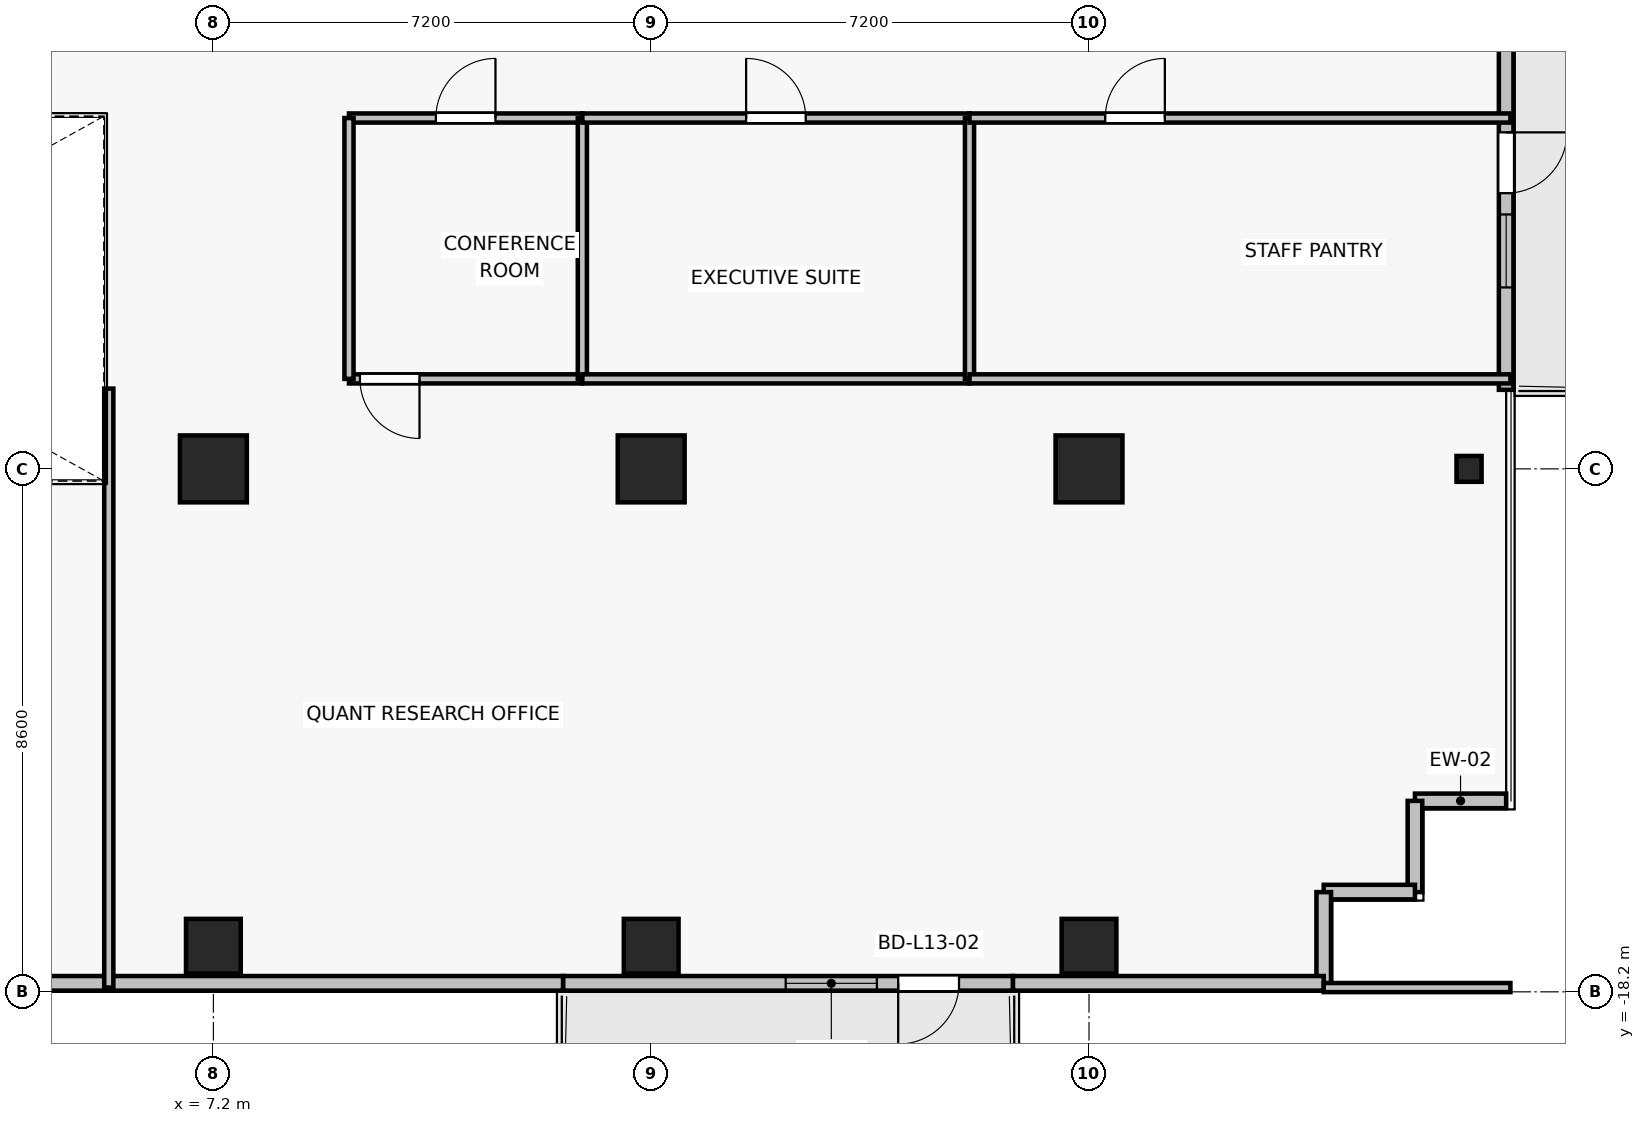
"""IFC4 building model, lengths in metres.
Left out: names, types, materials, properties, quantities, classifications, styles, units other than length and angle.
Written with IfcOpenShell. Run it as: python <this file> out.ifc"""

import sys

from ifc_helpers import new_model, si_unit, direction, frame, frame_2d, origin, origin_2d, place, context, subcontext, project, spatial, rectangle, i_section, extrude, source, transform, mapped, element, fill, save


model = new_model("IFC4")
c1 = context("Model", 3, precision=1e-05, world=origin(), true_north=direction((0.0, 1.0)))
c2 = subcontext(c1, "Body", "Model", "MODEL_VIEW")
j1 = project(units=[si_unit("LENGTHUNIT", "METRE"), si_unit("PLANEANGLEUNIT", "RADIAN")], contexts=[c1])
p1 = place(None, origin())
s1 = spatial("IfcSite", under=j1, at=p1, CompositionType="ELEMENT")
p2 = place(p1, origin())
s2 = spatial("IfcBuilding", under=s1, at=p2, CompositionType="ELEMENT")
p3 = place(p2, frame((0.0, 0.0, 50.5)))
s3 = spatial("IfcBuildingStorey", under=s2, at=p3, CompositionType="ELEMENT", Elevation=50.5)
for number, where, z_axis, x_axis in (
    (1, (7.2, -9.6, 0.0), (0.0, 0.0, 1.0), (1.0, 0.0, 0.0)),
    (2, (14.4, -9.6, 0.0), (0.0, 0.0, 1.0), (1.0, 0.0, 0.0)),
    (3, (21.6, -9.6, 0.0), (0.0, 0.0, 1.0), (1.0, 0.0, 0.0)),
):
    element("IfcColumn", number, at=place(p3, frame(where, z_axis=z_axis, x_axis=x_axis)), inside=s3, PredefinedType="COLUMN", context=c2, shape_type="SweptSolid", body=[
        extrude(rectangle(XDim=1.1, YDim=1.1, at=origin_2d()), origin(), (0.0, 0.0, 1.0), 3.3),
    ])
for number, where, z_axis, x_axis in (
    (4, (7.2, -17.45, 0.0), (0.0, 0.0, 1.0), (1.0, 0.0, 0.0)),
    (5, (14.4, -17.45, 0.0), (0.0, 0.0, 1.0), (1.0, 0.0, 0.0)),
    (6, (21.6, -17.45, 0.0), (0.0, 0.0, 1.0), (1.0, 0.0, 0.0)),
):
    element("IfcColumn", number, at=place(p3, frame(where, z_axis=z_axis, x_axis=x_axis)), inside=s3, PredefinedType="COLUMN", context=c2, shape_type="SweptSolid", body=[
        extrude(rectangle(XDim=0.9, YDim=0.9, at=origin_2d()), origin(), (0.0, 0.0, 1.0), 3.3),
    ])
p4 = place(p3, frame((27.85, -9.6, 0.0), z_axis=(0.0, 0.0, 1.0), x_axis=(1.0, 0.0, 0.0)))
e7 = element("IfcColumn", 7, at=p4, inside=s3, PredefinedType="COLUMN", context=c2, shape_type="SweptSolid", body=[
    extrude(i_section(OverallWidth=0.412, OverallDepth=0.425, WebThickness=0.026, FlangeThickness=0.039, FilletRadius=0.015, at=origin_2d()), origin(), (0.0, 0.0, 1.0), 3.3),
])
p5 = place(p3, frame((20.35, -18.06, 0.0), z_axis=(0.0, 0.0, 1.0), x_axis=(-1.0, 0.0, 0.0)))
e8 = element("IfcWall", 8, at=p5, inside=s3, PredefinedType="SOLIDWALL", context=c2, shape_type="SweptSolid", body=[
    extrude(rectangle(XDim=7.4, YDim=0.24, at=frame_2d((3.7, 0.0))), origin(), (0.0, 0.0, 1.0), 2.59),
])
p6 = place(p5, frame((0.888, 0.0, 0.0)))
e9 = element("IfcOpeningElement", 9, at=p6, cuts=e8, PredefinedType="OPENING", context=c2, shape_type="SweptSolid", body=[
    extrude(rectangle(XDim=1.0, YDim=2.2, at=frame_2d((0.5, 1.1))), frame((0.0, 0.13, 0.0), z_axis=(0.0, -1.0, 0.0), x_axis=(1.0, 0.0, 0.0)), (0.0, 0.0, 1.0), 0.26),
])
p7 = place(p5, frame((2.238, 0.0, 0.85)))
e10 = element("IfcOpeningElement", 10, at=p7, cuts=e8, PredefinedType="OPENING", context=c2, shape_type="SweptSolid", body=[
    extrude(rectangle(XDim=1.5, YDim=1.6, at=frame_2d((0.75, 0.8))), frame((0.0, 0.13, 0.0), z_axis=(0.0, -1.0, 0.0), x_axis=(1.0, 0.0, 0.0)), (0.0, 0.0, 1.0), 0.26),
])
p8 = place(p3, frame((28.46, -2.5, 0.0), z_axis=(0.0, 0.0, 1.0), x_axis=(0.0, -1.0, 0.0)))
e11 = element("IfcWall", 11, at=p8, inside=s3, PredefinedType="SOLIDWALL", context=c2, shape_type="SweptSolid", body=[
    extrude(rectangle(XDim=5.8, YDim=0.24, at=frame_2d((2.9, 0.0))), origin(), (0.0, 0.0, 1.0), 2.565),
])
p9 = place(p8, frame((1.566, 0.0, 0.0)))
e12 = element("IfcOpeningElement", 12, at=p9, cuts=e11, PredefinedType="OPENING", context=c2, shape_type="SweptSolid", body=[
    extrude(rectangle(XDim=1.0, YDim=2.2, at=frame_2d((0.5, 1.1))), frame((0.0, 0.13, 0.0), z_axis=(0.0, -1.0, 0.0), x_axis=(1.0, 0.0, 0.0)), (0.0, 0.0, 1.0), 0.26),
])
p10 = place(p8, frame((2.916, 0.0, 0.85)))
e13 = element("IfcOpeningElement", 13, at=p10, cuts=e11, PredefinedType="OPENING", context=c2, shape_type="SweptSolid", body=[
    extrude(rectangle(XDim=1.2, YDim=1.5, at=frame_2d((0.6, 0.75))), frame((0.0, 0.13, 0.0), z_axis=(0.0, -1.0, 0.0), x_axis=(1.0, 0.0, 0.0)), (0.0, 0.0, 1.0), 0.26),
])
for number, where, z_axis, x_axis in (
    (14, (26.96, -15.06, 0.0), (0.0, 0.0, 1.0), (1.0, 0.0, 0.0)),
    (15, (26.96, -16.56, 0.0), (0.0, 0.0, 1.0), (0.0, 1.0, 0.0)),
    (16, (25.46, -16.56, 0.0), (0.0, 0.0, 1.0), (1.0, 0.0, 0.0)),
    (17, (25.46, -18.06, 0.0), (0.0, 0.0, 1.0), (0.0, 1.0, 0.0)),
):
    element("IfcWall", number, at=place(p3, frame(where, z_axis=z_axis, x_axis=x_axis)), inside=s3, PredefinedType="SOLIDWALL", context=c2, shape_type="SweptSolid", body=[
        extrude(rectangle(XDim=1.5, YDim=0.24, at=frame_2d((0.75, 0.0))), origin(), (0.0, 0.0, 1.0), 3.075),
    ])
p11 = place(p3, frame((20.35, -18.06, 0.0), z_axis=(0.0, 0.0, 1.0), x_axis=(1.0, 0.0, 0.0)))
e18 = element("IfcWall", 18, at=p11, inside=s3, PredefinedType="SOLIDWALL", context=c2, shape_type="SweptSolid", body=[
    extrude(rectangle(XDim=5.11, YDim=0.24, at=frame_2d((2.555, 0.0))), origin(), (0.0, 0.0, 1.0), 2.59),
])
p12 = place(p3, frame((3.34, -18.06, 0.0), z_axis=(0.0, 0.0, 1.0), x_axis=(1.0, 0.0, 0.0)))
e19 = element("IfcWall", 19, at=p12, inside=s3, PredefinedType="SOLIDWALL", context=c2, shape_type="SweptSolid", body=[
    extrude(rectangle(XDim=9.61, YDim=0.24, at=frame_2d((4.805, 0.0))), origin(), (0.0, 0.0, 1.0), 2.59),
])
p13 = place(p3, frame((13.268, -8.12, 0.0), z_axis=(0.0, 0.0, 1.0), x_axis=(-1.0, 0.0, 0.0)))
e20 = element("IfcWall", 20, at=p13, inside=s3, PredefinedType="PARTITIONING", context=c2, shape_type="SweptSolid", body=[
    extrude(rectangle(XDim=3.838, YDim=0.15, at=frame_2d((1.919, 0.0))), origin(), (0.0, 0.0, 1.0), 3.075),
])
p14 = place(p13, frame((2.678, 0.0, 0.0)))
e21 = element("IfcOpeningElement", 21, at=p14, cuts=e20, PredefinedType="OPENING", context=c2, shape_type="SweptSolid", body=[
    extrude(rectangle(XDim=0.98, YDim=2.15, at=frame_2d((0.49, 1.075))), frame((0.0, 0.085, 0.0), z_axis=(0.0, -1.0, 0.0), x_axis=(1.0, 0.0, 0.0)), (0.0, 0.0, 1.0), 0.17),
])
p15 = place(p3, frame((9.43, -3.83, 0.0), z_axis=(0.0, 0.0, 1.0), x_axis=(1.0, 0.0, 0.0)))
e22 = element("IfcWall", 22, at=p15, inside=s3, PredefinedType="PARTITIONING", context=c2, shape_type="SweptSolid", body=[
    extrude(rectangle(XDim=3.838, YDim=0.15, at=frame_2d((1.919, 0.0))), origin(), (0.0, 0.0, 1.0), 3.075),
])
p16 = place(p15, frame((1.429, 0.0, 0.0)))
e23 = element("IfcOpeningElement", 23, at=p16, cuts=e22, PredefinedType="OPENING", context=c2, shape_type="SweptSolid", body=[
    extrude(rectangle(XDim=0.98, YDim=2.15, at=frame_2d((0.49, 1.075))), frame((0.0, 0.085, 0.0), z_axis=(0.0, -1.0, 0.0), x_axis=(1.0, 0.0, 0.0)), (0.0, 0.0, 1.0), 0.17),
])
for number, where, z_axis, x_axis in (
    (24, (9.43, -8.12, 0.0), (0.0, 0.0, 1.0), (0.0, 1.0, 0.0)),
    (25, (13.268, -3.83, 0.0), (0.0, 0.0, 1.0), (0.0, -1.0, 0.0)),
):
    element("IfcWall", number, at=place(p3, frame(where, z_axis=z_axis, x_axis=x_axis)), inside=s3, PredefinedType="PARTITIONING", context=c2, shape_type="SweptSolid", body=[
        extrude(rectangle(XDim=4.29, YDim=0.15, at=frame_2d((2.145, 0.0))), origin(), (0.0, 0.0, 1.0), 2.565),
    ])
p17 = place(p3, frame((19.635, -8.12, 0.0), z_axis=(0.0, 0.0, 1.0), x_axis=(-1.0, 0.0, 0.0)))
e26 = element("IfcWall", 26, at=p17, inside=s3, PredefinedType="PARTITIONING", context=c2, shape_type="SweptSolid", body=[
    extrude(rectangle(XDim=6.367, YDim=0.15, at=frame_2d((3.183, 0.0))), origin(), (0.0, 0.0, 1.0), 2.465),
])
p18 = place(p3, frame((13.268, -3.83, 0.0), z_axis=(0.0, 0.0, 1.0), x_axis=(1.0, 0.0, 0.0)))
e27 = element("IfcWall", 27, at=p18, inside=s3, PredefinedType="PARTITIONING", context=c2, shape_type="SweptSolid", body=[
    extrude(rectangle(XDim=6.367, YDim=0.15, at=frame_2d((3.183, 0.0))), origin(), (0.0, 0.0, 1.0), 2.465),
])
p19 = place(p18, frame((2.693, 0.0, 0.0)))
e28 = element("IfcOpeningElement", 28, at=p19, cuts=e27, PredefinedType="OPENING", context=c2, shape_type="SweptSolid", body=[
    extrude(rectangle(XDim=0.98, YDim=2.15, at=frame_2d((0.49, 1.075))), frame((0.0, 0.085, 0.0), z_axis=(0.0, -1.0, 0.0), x_axis=(1.0, 0.0, 0.0)), (0.0, 0.0, 1.0), 0.17),
])
p20 = place(p3, frame((19.635, -3.83, 0.0), z_axis=(0.0, 0.0, 1.0), x_axis=(0.0, -1.0, 0.0)))
e29 = element("IfcWall", 29, at=p20, inside=s3, PredefinedType="PARTITIONING", context=c2, shape_type="SweptSolid", body=[
    extrude(rectangle(XDim=4.29, YDim=0.15, at=frame_2d((2.145, 0.0))), origin(), (0.0, 0.0, 1.0), 2.565),
])
p21 = place(p3, frame((28.53, -8.12, 0.0), z_axis=(0.0, 0.0, 1.0), x_axis=(-1.0, 0.0, 0.0)))
e30 = element("IfcWall", 30, at=p21, inside=s3, PredefinedType="PARTITIONING", context=c2, shape_type="SweptSolid", body=[
    extrude(rectangle(XDim=8.895, YDim=0.15, at=frame_2d((4.448, 0.0))), origin(), (0.0, 0.0, 1.0), 2.465),
])
p22 = place(p3, frame((19.635, -3.83, 0.0), z_axis=(0.0, 0.0, 1.0), x_axis=(1.0, 0.0, 0.0)))
e31 = element("IfcWall", 31, at=p22, inside=s3, PredefinedType="PARTITIONING", context=c2, shape_type="SweptSolid", body=[
    extrude(rectangle(XDim=8.895, YDim=0.15, at=frame_2d((4.448, 0.0))), origin(), (0.0, 0.0, 1.0), 2.465),
])
p23 = place(p22, frame((2.232, 0.0, 0.0)))
e32 = element("IfcOpeningElement", 32, at=p23, cuts=e31, PredefinedType="OPENING", context=c2, shape_type="SweptSolid", body=[
    extrude(rectangle(XDim=0.98, YDim=2.15, at=frame_2d((0.49, 1.075))), frame((0.0, 0.085, 0.0), z_axis=(0.0, -1.0, 0.0), x_axis=(1.0, 0.0, 0.0)), (0.0, 0.0, 1.0), 0.17),
])
p24 = place(p3, frame((28.53, -18.13, 0.0), z_axis=(0.0, 0.0, 1.0), x_axis=(-1.0, 0.0, 0.0)))
e33 = element("IfcWall", 33, at=p24, inside=s3, PredefinedType="PARTITIONING", context=c2, shape_type="SweptSolid", body=[
    extrude(rectangle(XDim=3.07, YDim=0.15, at=frame_2d((1.535, 0.0))), origin(), (0.0, 0.0, 1.0), 2.59),
])
p25 = place(p3, frame((5.48, -18.13, 0.0), z_axis=(0.0, 0.0, 1.0), x_axis=(0.0, 1.0, 0.0)))
e34 = element("IfcWall", 34, at=p25, inside=s3, PredefinedType="PARTITIONING", context=c2, shape_type="SweptSolid", body=[
    extrude(rectangle(XDim=9.85, YDim=0.15, at=frame_2d((4.925, 0.0))), origin(), (0.0, 0.0, 1.0), 2.465),
])
m1 = source(origin(), c2, "Body", "SweptSolid", [
    extrude(rectangle(XDim=1.0, YDim=2.2, at=frame_2d((0.5, 1.1))), frame((0.0, 0.025, 0.0), z_axis=(0.0, -1.0, 0.0), x_axis=(1.0, 0.0, 0.0)), (0.0, 0.0, 1.0), 0.05),
])
p26 = place(p6, origin())
e35 = element("IfcDoor", 35, at=p26, inside=s3, OperationType="SINGLE_SWING_RIGHT", PredefinedType="DOOR", context=c2, shape_type="MappedRepresentation", body=[
    mapped(m1, transform((0.0, 0.0, 0.0), x_axis=(1.0, 0.0, 0.0), y_axis=(0.0, 1.0, 0.0), z_axis=(0.0, 0.0, 1.0), scale=1.0)),
])
fill(e9, e35)
m2 = source(origin(), c2, "Body", "SweptSolid", [
    extrude(rectangle(XDim=1.5, YDim=1.6, at=frame_2d((0.75, 0.8))), frame((0.0, 0.03, 0.0), z_axis=(0.0, -1.0, 0.0), x_axis=(1.0, 0.0, 0.0)), (0.0, 0.0, 1.0), 0.06),
])
p27 = place(p7, origin())
e36 = element("IfcWindow", 36, at=p27, inside=s3, PartitioningType="SINGLE_PANEL", PredefinedType="WINDOW", context=c2, shape_type="MappedRepresentation", body=[
    mapped(m2, transform((0.0, 0.0, 0.0), x_axis=(1.0, 0.0, 0.0), y_axis=(0.0, 1.0, 0.0), z_axis=(0.0, 0.0, 1.0), scale=1.0)),
])
fill(e10, e36)
p28 = place(p9, origin())
e37 = element("IfcDoor", 37, at=p28, inside=s3, OperationType="SINGLE_SWING_LEFT", PredefinedType="DOOR", context=c2, shape_type="MappedRepresentation", body=[
    mapped(m1, transform((0.0, 0.0, 0.0), x_axis=(1.0, 0.0, 0.0), y_axis=(0.0, 1.0, 0.0), z_axis=(0.0, 0.0, 1.0), scale=1.0)),
])
fill(e12, e37)
m3 = source(origin(), c2, "Body", "SweptSolid", [
    extrude(rectangle(XDim=1.2, YDim=1.5, at=frame_2d((0.6, 0.75))), frame((0.0, 0.03, 0.0), z_axis=(0.0, -1.0, 0.0), x_axis=(1.0, 0.0, 0.0)), (0.0, 0.0, 1.0), 0.06),
])
p29 = place(p10, origin())
e38 = element("IfcWindow", 38, at=p29, inside=s3, PartitioningType="SINGLE_PANEL", PredefinedType="WINDOW", context=c2, shape_type="MappedRepresentation", body=[
    mapped(m3, transform((0.0, 0.0, 0.0), x_axis=(1.0, 0.0, 0.0), y_axis=(0.0, 1.0, 0.0), z_axis=(0.0, 0.0, 1.0), scale=1.0)),
])
fill(e13, e38)
m4 = source(origin(), c2, "Body", "SweptSolid", [
    extrude(rectangle(XDim=0.98, YDim=2.15, at=frame_2d((0.49, 1.075))), frame((0.0, 0.025, 0.0), z_axis=(0.0, -1.0, 0.0), x_axis=(1.0, 0.0, 0.0)), (0.0, 0.0, 1.0), 0.05),
])
p30 = place(p16, origin())
e39 = element("IfcDoor", 39, at=p30, inside=s3, OperationType="SINGLE_SWING_RIGHT", PredefinedType="DOOR", context=c2, shape_type="MappedRepresentation", body=[
    mapped(m4, transform((0.0, 0.0, 0.0), x_axis=(1.0, 0.0, 0.0), y_axis=(0.0, 1.0, 0.0), z_axis=(0.0, 0.0, 1.0), scale=1.0)),
])
fill(e23, e39)
p31 = place(p19, origin())
e40 = element("IfcDoor", 40, at=p31, inside=s3, OperationType="SINGLE_SWING_LEFT", PredefinedType="DOOR", context=c2, shape_type="MappedRepresentation", body=[
    mapped(m4, transform((0.0, 0.0, 0.0), x_axis=(1.0, 0.0, 0.0), y_axis=(0.0, 1.0, 0.0), z_axis=(0.0, 0.0, 1.0), scale=1.0)),
])
fill(e28, e40)
p32 = place(p23, origin())
e41 = element("IfcDoor", 41, at=p32, inside=s3, OperationType="SINGLE_SWING_RIGHT", PredefinedType="DOOR", context=c2, shape_type="MappedRepresentation", body=[
    mapped(m4, transform((0.0, 0.0, 0.0), x_axis=(1.0, 0.0, 0.0), y_axis=(0.0, 1.0, 0.0), z_axis=(0.0, 0.0, 1.0), scale=1.0)),
])
fill(e32, e41)
p33 = place(p14, origin())
e42 = element("IfcDoor", 42, at=p33, inside=s3, OperationType="SINGLE_SWING_LEFT", PredefinedType="DOOR", context=c2, shape_type="MappedRepresentation", body=[
    mapped(m4, transform((0.0, 0.0, 0.0), x_axis=(1.0, 0.0, 0.0), y_axis=(0.0, 1.0, 0.0), z_axis=(0.0, 0.0, 1.0), scale=1.0)),
])
fill(e21, e42)
save(model, sys.argv[1])
